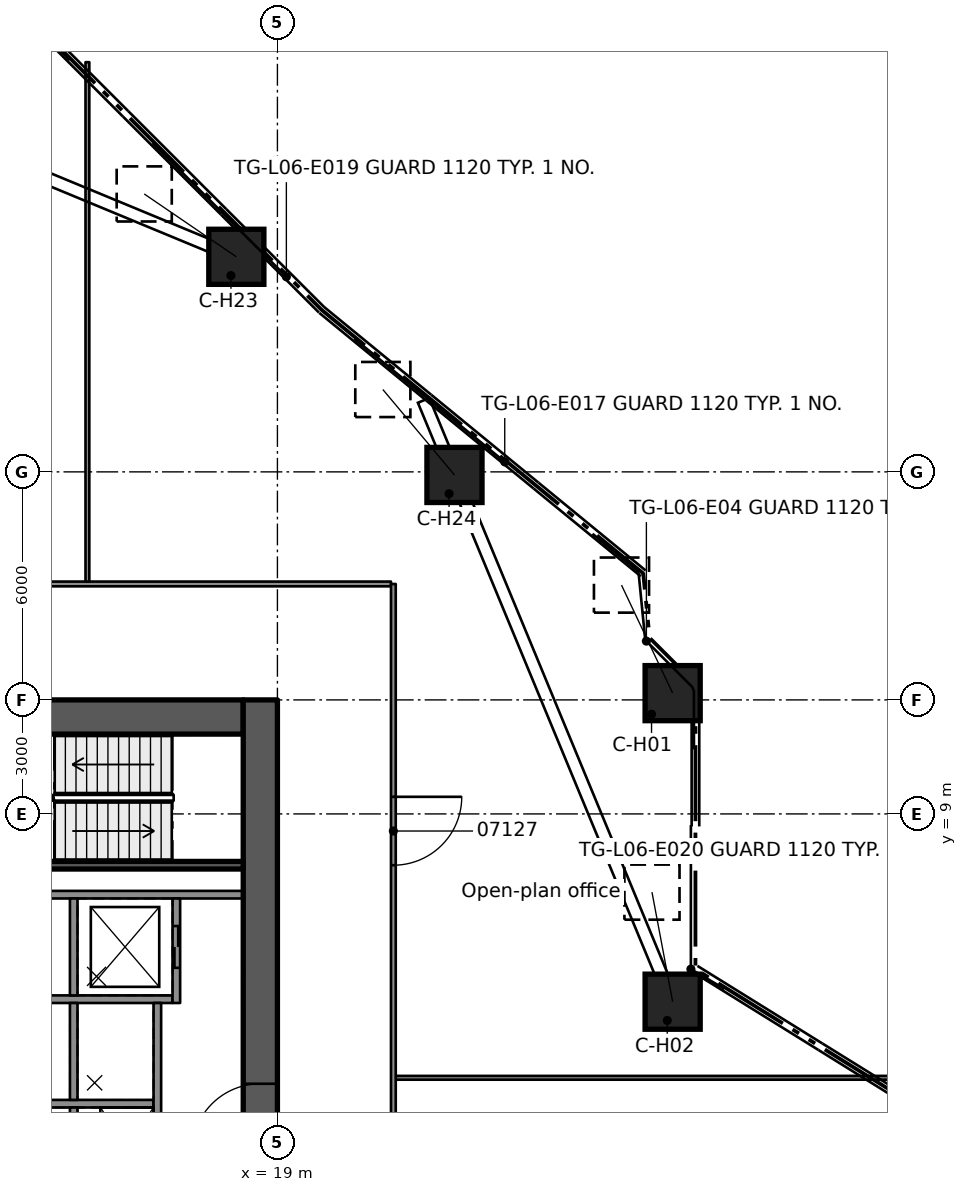
"""IFC4 building model, lengths in metres.
Left out: names, types, materials, properties, quantities, classifications, styles, units other than length and angle.
Written with IfcOpenShell. Run it as: python <this file> out.ifc"""

import sys

from ifc_helpers import new_model, si_unit, direction, frame, frame_2d, origin, origin_2d, place, context, subcontext, project, spatial, rectangle, extrude, element, fill, save


model = new_model("IFC4")
c1 = context("Model", 3, precision=1e-05, world=origin(), true_north=direction((0.0, 1.0)))
c2 = subcontext(c1, "Body", "Model", "MODEL_VIEW")
j1 = project(units=[si_unit("LENGTHUNIT", "METRE"), si_unit("PLANEANGLEUNIT", "RADIAN")], contexts=[c1])
p1 = place(None, origin())
s1 = spatial("IfcSite", under=j1, at=p1, CompositionType="ELEMENT")
p2 = place(p1, origin())
s2 = spatial("IfcBuilding", under=s1, at=p2, CompositionType="ELEMENT")
p3 = place(p2, frame((0.0, 0.0, 33.3)))
s3 = spatial("IfcBuildingStorey", under=s2, at=p3, CompositionType="ELEMENT", Elevation=33.3)
p4 = place(p3, frame((8.9, 11.55, 0.0), z_axis=(0.0, 0.0, 1.0), x_axis=(1.0, 0.0, 0.0)))
e1 = element("IfcWall", 1, at=p4, inside=s3, PredefinedType="SHEAR", context=c2, shape_type="SweptSolid", body=[
    extrude(rectangle(XDim=9.2, YDim=0.9, at=frame_2d((4.6, 0.0))), origin(), (0.0, 0.0, 1.0), 4.0),
])
p5 = place(p4, frame((3.0, 0.0, 0.0)))
e2 = element("IfcOpeningElement", 2, at=p5, cuts=e1, PredefinedType="OPENING", context=c2, shape_type="SweptSolid", body=[
    extrude(rectangle(XDim=1.1, YDim=2.1, at=frame_2d((0.55, 1.05))), frame((0.0, 0.46, 0.0), z_axis=(0.0, -1.0, 0.0), x_axis=(1.0, 0.0, 0.0)), (0.0, 0.0, 1.0), 0.92),
])
p6 = place(p4, frame((0.77, 0.0, 0.0)))
e3 = element("IfcOpeningElement", 3, at=p6, cuts=e1, PredefinedType="OPENING", context=c2, shape_type="SweptSolid", body=[
    extrude(rectangle(XDim=0.9, YDim=2.1, at=frame_2d((0.45, 1.05))), frame((0.0, 0.46, 0.0), z_axis=(0.0, -1.0, 0.0), x_axis=(1.0, 0.0, 0.0)), (0.0, 0.0, 1.0), 0.92),
])
p7 = place(p3, frame((18.55, -12.0, 0.0), z_axis=(0.0, 0.0, 1.0), x_axis=(0.0, 1.0, 0.0)))
e4 = element("IfcWall", 4, at=p7, inside=s3, PredefinedType="SHEAR", context=c2, shape_type="SweptSolid", body=[
    extrude(rectangle(XDim=24.0, YDim=0.9, at=frame_2d((12.0, 0.0))), origin(), (0.0, 0.0, 1.0), 4.0),
])
p8 = place(p7, frame((12.1, 0.0, 0.0)))
e5 = element("IfcOpeningElement", 5, at=p8, cuts=e4, PredefinedType="OPENING", context=c2, shape_type="SweptSolid", body=[
    extrude(rectangle(XDim=1.8, YDim=2.1, at=frame_2d((0.9, 1.05))), frame((0.0, 0.46, 0.0), z_axis=(0.0, -1.0, 0.0), x_axis=(1.0, 0.0, 0.0)), (0.0, 0.0, 1.0), 0.92),
])
p9 = place(p3, frame((29.4, 12.178, 0.53), z_axis=(-0.312560635038, 0.660215598589, 0.682950373603), x_axis=(-0.903829481424, -0.427892823623, 0.0)))
e6 = element("IfcColumn", 6, at=p9, inside=s3, PredefinedType="COLUMN", context=c2, shape_type="SweptSolid", body=[
    extrude(rectangle(XDim=1.45, YDim=1.45, at=origin_2d()), origin(), (0.0, 0.0, 1.0), 4.306),
])
p10 = place(p3, frame((29.4, 4.059, 0.508), z_axis=(-0.130006651481, 0.68901191234, 0.712994288353), x_axis=(-0.98266050942, -0.185413924034, 0.0)))
e7 = element("IfcColumn", 7, at=p10, inside=s3, PredefinedType="COLUMN", context=c2, shape_type="SweptSolid", body=[
    extrude(rectangle(XDim=1.45, YDim=1.45, at=origin_2d()), origin(), (0.0, 0.0, 1.0), 4.184),
])
p11 = place(p3, frame((17.919, 23.659, 0.508), z_axis=(-0.579239562537, 0.395280825563, 0.712905742812), x_axis=(-0.563672389997, -0.825998448397, 0.0)))
e8 = element("IfcColumn", 8, at=p11, inside=s3, PredefinedType="COLUMN", context=c2, shape_type="SweptSolid", body=[
    extrude(rectangle(XDim=1.45, YDim=1.45, at=origin_2d()), origin(), (0.0, 0.0, 1.0), 4.185),
])
p12 = place(p3, frame((23.659, 17.919, 0.508), z_axis=(-0.450505155937, 0.537268679687, 0.713012952408), x_axis=(-0.766266875891, -0.642522431446, 0.0)))
e9 = element("IfcColumn", 9, at=p12, inside=s3, PredefinedType="COLUMN", context=c2, shape_type="SweptSolid", body=[
    extrude(rectangle(XDim=1.45, YDim=1.45, at=origin_2d()), origin(), (0.0, 0.0, 1.0), 4.184),
])
p13 = place(p3, frame((11.54, 6.875, 0.0), z_axis=(0.0, 0.0, 1.0), x_axis=(1.0, 0.0, 0.0)))
e10 = element("IfcWall", 10, at=p13, inside=s3, PredefinedType="SOLIDWALL", context=c2, shape_type="SweptSolid", body=[
    extrude(rectangle(XDim=6.56, YDim=0.2, at=frame_2d((3.28, 0.0))), origin(), (0.0, 0.0, 1.0), 3.58),
])
p14 = place(p3, frame((11.54, 4.125, 0.0), z_axis=(0.0, 0.0, 1.0), x_axis=(1.0, 0.0, 0.0)))
e11 = element("IfcWall", 11, at=p14, inside=s3, PredefinedType="SOLIDWALL", context=c2, shape_type="SweptSolid", body=[
    extrude(rectangle(XDim=4.7, YDim=0.2, at=frame_2d((2.35, 0.0))), origin(), (0.0, 0.0, 1.0), 3.58),
])
p15 = place(p3, frame((11.54, 1.375, 0.0), z_axis=(0.0, 0.0, 1.0), x_axis=(1.0, 0.0, 0.0)))
e12 = element("IfcWall", 12, at=p15, inside=s3, PredefinedType="SOLIDWALL", context=c2, shape_type="SweptSolid", body=[
    extrude(rectangle(XDim=4.2, YDim=0.2, at=frame_2d((2.1, 0.0))), origin(), (0.0, 0.0, 1.0), 3.58),
])
for number, where, z_axis, x_axis in (
    (13, (13.64, 6.775, 0.0), (0.0, 0.0, 1.0), (0.0, -1.0, 0.0)),
    (14, (13.64, 4.025, 0.0), (0.0, 0.0, 1.0), (0.0, -1.0, 0.0)),
    (15, (13.64, 1.275, 0.0), (0.0, 0.0, 1.0), (0.0, -1.0, 0.0)),
):
    element("IfcWall", number, at=place(p3, frame(where, z_axis=z_axis, x_axis=x_axis)), inside=s3, PredefinedType="SOLIDWALL", context=c2, shape_type="SweptSolid", body=[
        extrude(rectangle(XDim=2.55, YDim=0.2, at=frame_2d((1.275, 0.0))), origin(), (0.0, 0.0, 1.0), 3.58),
    ])
p16 = place(p3, frame((16.34, 6.775, 0.0), z_axis=(0.0, 0.0, 1.0), x_axis=(0.0, -1.0, 0.0)))
e16 = element("IfcWall", 16, at=p16, inside=s3, PredefinedType="SOLIDWALL", context=c2, shape_type="SweptSolid", body=[
    extrude(rectangle(XDim=2.75, YDim=0.2, at=frame_2d((1.375, 0.0))), origin(), (0.0, 0.0, 1.0), 3.58),
])
p17 = place(p16, frame((0.725, 0.0, 0.0)))
e17 = element("IfcOpeningElement", 17, at=p17, cuts=e16, PredefinedType="OPENING", context=c2, shape_type="SweptSolid", body=[
    extrude(rectangle(XDim=1.1, YDim=2.1, at=frame_2d((0.55, 1.05))), frame((0.0, 0.11, 0.0), z_axis=(0.0, -1.0, 0.0), x_axis=(1.0, 0.0, 0.0)), (0.0, 0.0, 1.0), 0.22),
])
p18 = place(p3, frame((15.84, 4.025, 0.0), z_axis=(0.0, 0.0, 1.0), x_axis=(0.0, -1.0, 0.0)))
e18 = element("IfcWall", 18, at=p18, inside=s3, PredefinedType="SOLIDWALL", context=c2, shape_type="SweptSolid", body=[
    extrude(rectangle(XDim=8.05, YDim=0.2, at=frame_2d((4.025, 0.0))), origin(), (0.0, 0.0, 1.0), 3.58),
])
p19 = place(p18, frame((3.475, 0.0, 0.0)))
e19 = element("IfcOpeningElement", 19, at=p19, cuts=e18, PredefinedType="OPENING", context=c2, shape_type="SweptSolid", body=[
    extrude(rectangle(XDim=1.1, YDim=2.1, at=frame_2d((0.55, 1.05))), frame((0.0, 0.11, 0.0), z_axis=(0.0, -1.0, 0.0), x_axis=(1.0, 0.0, 0.0)), (0.0, 0.0, 1.0), 0.22),
])
p20 = place(p18, frame((6.225, 0.0, 0.0)))
e20 = element("IfcOpeningElement", 20, at=p20, cuts=e18, PredefinedType="OPENING", context=c2, shape_type="SweptSolid", body=[
    extrude(rectangle(XDim=1.1, YDim=2.1, at=frame_2d((0.55, 1.05))), frame((0.0, 0.11, 0.0), z_axis=(0.0, -1.0, 0.0), x_axis=(1.0, 0.0, 0.0)), (0.0, 0.0, 1.0), 0.22),
])
p21 = place(p3, frame((11.54, 7.65, 0.0), z_axis=(0.0, 0.0, 1.0), x_axis=(1.0, 0.0, 0.0)))
e21 = element("IfcWall", 21, at=p21, inside=s3, PredefinedType="SOLIDWALL", context=c2, shape_type="SweptSolid", body=[
    extrude(rectangle(XDim=6.56, YDim=0.2, at=frame_2d((3.28, 0.0))), origin(), (0.0, 0.0, 1.0), 3.58),
])
p22 = place(p3, frame((22.113, 2.057, 0.0), z_axis=(0.0, 0.0, 1.0), x_axis=(1.0, 0.0, 0.0)))
e22 = element("IfcWall", 22, at=p22, inside=s3, PredefinedType="PARTITIONING", context=c2, shape_type="SweptSolid", body=[
    extrude(rectangle(XDim=12.966, YDim=0.1, at=frame_2d((6.483, 0.0))), origin(), (0.0, 0.0, 1.0), 3.56),
])
p23 = place(p3, frame((10.991, 15.051, 0.0), z_axis=(0.0, 0.0, 1.0), x_axis=(1.0, 0.0, 0.0)))
e23 = element("IfcWall", 23, at=p23, inside=s3, PredefinedType="PARTITIONING", context=c2, shape_type="SweptSolid", body=[
    extrude(rectangle(XDim=10.997, YDim=0.125, at=frame_2d((5.499, 0.0))), origin(), (0.0, 0.0, 1.0), 3.56),
])
p24 = place(p3, frame((22.051, 15.05, 0.0), z_axis=(0.0, 0.0, 1.0), x_axis=(0.0, -1.0, 0.0)))
e24 = element("IfcWall", 24, at=p24, inside=s3, PredefinedType="PARTITIONING", context=c2, shape_type="SweptSolid", body=[
    extrude(rectangle(XDim=25.984, YDim=0.125, at=frame_2d((12.992, 0.0))), origin(), (0.0, 0.0, 1.0), 3.56),
])
p25 = place(p24, frame((18.593, 0.0, 0.0)))
e25 = element("IfcOpeningElement", 25, at=p25, cuts=e24, PredefinedType="OPENING", context=c2, shape_type="SweptSolid", body=[
    extrude(rectangle(XDim=1.8, YDim=2.1, at=frame_2d((0.9, 1.05))), frame((0.0, 0.073, 0.0), z_axis=(0.0, -1.0, 0.0), x_axis=(1.0, 0.0, 0.0)), (0.0, 0.0, 1.0), 0.145),
])
p26 = place(p24, frame((5.6, 0.0, 0.0)))
e26 = element("IfcOpeningElement", 26, at=p26, cuts=e24, PredefinedType="OPENING", context=c2, shape_type="SweptSolid", body=[
    extrude(rectangle(XDim=1.8, YDim=2.1, at=frame_2d((0.9, 1.05))), frame((0.0, 0.073, 0.0), z_axis=(0.0, -1.0, 0.0), x_axis=(1.0, 0.0, 0.0)), (0.0, 0.0, 1.0), 0.145),
])
p27 = place(p3, frame((14.0, 15.114, 0.0), z_axis=(0.0, 0.0, 1.0), x_axis=(0.0, 1.0, 0.0)))
e27 = element("IfcWall", 27, at=p27, inside=s3, PredefinedType="PARTITIONING", context=c2, shape_type="SweptSolid", body=[
    extrude(rectangle(XDim=13.666, YDim=0.1, at=frame_2d((6.833, 0.0))), origin(), (0.0, 0.0, 1.0), 3.56),
])
p28 = place(p17, origin())
e28 = element("IfcDoor", 28, at=p28, inside=s3, OperationType="DOUBLE_DOOR_SLIDING", PredefinedType="DOOR", context=c2, shape_type="SweptSolid", body=[
    extrude(rectangle(XDim=1.1, YDim=2.1, at=frame_2d((0.55, 1.05))), frame((0.0, 0.025, 0.0), z_axis=(0.0, -1.0, 0.0), x_axis=(1.0, 0.0, 0.0)), (0.0, 0.0, 1.0), 0.05),
])
fill(e17, e28)
p29 = place(p8, origin())
e29 = element("IfcDoor", 29, at=p29, inside=s3, OperationType="SINGLE_SWING_RIGHT", PredefinedType="DOOR", context=c2, shape_type="SweptSolid", body=[
    extrude(rectangle(XDim=1.8, YDim=2.1, at=frame_2d((0.9, 1.05))), frame((0.0, 0.025, 0.0), z_axis=(0.0, -1.0, 0.0), x_axis=(1.0, 0.0, 0.0)), (0.0, 0.0, 1.0), 0.05),
])
fill(e5, e29)
p30 = place(p26, origin())
e30 = element("IfcDoor", 30, at=p30, inside=s3, OperationType="DOUBLE_DOOR_SINGLE_SWING", PredefinedType="DOOR", context=c2, shape_type="SweptSolid", body=[
    extrude(rectangle(XDim=1.8, YDim=2.1, at=frame_2d((0.9, 1.05))), frame((0.0, 0.025, 0.0), z_axis=(0.0, -1.0, 0.0), x_axis=(1.0, 0.0, 0.0)), (0.0, 0.0, 1.0), 0.05),
])
fill(e26, e30)
save(model, sys.argv[1])
